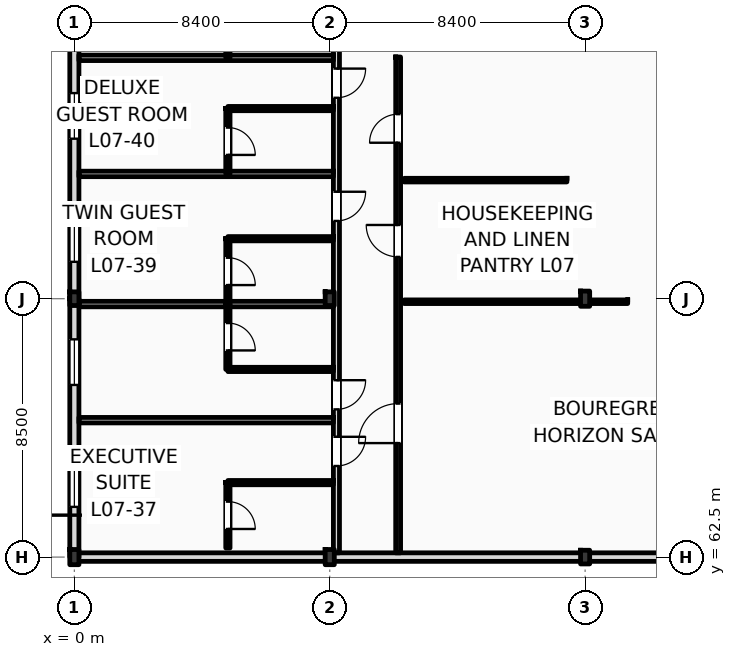
"""IFC4 building model, lengths in metres.
Left out: names, types, materials, properties, quantities, classifications, styles, units other than length and angle.
Written with IfcOpenShell. Run it as: python <this file> out.ifc"""

import sys

from ifc_helpers import new_model, si_unit, direction, frame, frame_2d, origin, origin_2d, place, context, subcontext, project, spatial, rectangle, i_section, extrude, element, fill, save


model = new_model("IFC4")
c1 = context("Model", 3, precision=1e-05, world=origin(), true_north=direction((0.0, 1.0)))
c2 = subcontext(c1, "Body", "Model", "MODEL_VIEW")
j1 = project(units=[si_unit("LENGTHUNIT", "METRE"), si_unit("PLANEANGLEUNIT", "RADIAN")], contexts=[c1])
p1 = place(None, origin())
s1 = spatial("IfcSite", under=j1, at=p1, CompositionType="ELEMENT")
p2 = place(p1, origin())
s2 = spatial("IfcBuilding", under=s1, at=p2, CompositionType="ELEMENT")
p3 = place(p2, frame((0.0, 0.0, 31.8)))
s3 = spatial("IfcBuildingStorey", under=s2, at=p3, CompositionType="ELEMENT", Elevation=31.8)
p4 = place(p3, frame((0.0, 62.5, 0.0), z_axis=(0.0, 0.0, 1.0), x_axis=(1.0, 0.0, 0.0)))
e1 = element("IfcColumn", 1, at=p4, inside=s3, PredefinedType="COLUMN", context=c2, shape_type="SweptSolid", body=[
    extrude(i_section(OverallWidth=0.3, OverallDepth=0.5, WebThickness=0.014, FlangeThickness=0.028, FilletRadius=0.027, at=origin_2d()), origin(), (0.0, 0.0, 1.0), 3.6),
])
p5 = place(p3, frame((0.0, 71.0, 0.0), z_axis=(0.0, 0.0, 1.0), x_axis=(1.0, 0.0, 0.0)))
e2 = element("IfcColumn", 2, at=p5, inside=s3, PredefinedType="COLUMN", context=c2, shape_type="SweptSolid", body=[
    extrude(i_section(OverallWidth=0.3, OverallDepth=0.45, WebThickness=0.014, FlangeThickness=0.026, FilletRadius=0.027, at=origin_2d()), origin(), (0.0, 0.0, 1.0), 3.6),
])
p6 = place(p3, frame((8.4, 62.5, 0.0), z_axis=(0.0, 0.0, 1.0), x_axis=(1.0, 0.0, 0.0)))
e3 = element("IfcColumn", 3, at=p6, inside=s3, PredefinedType="COLUMN", context=c2, shape_type="SweptSolid", body=[
    extrude(i_section(OverallWidth=0.3, OverallDepth=0.5, WebThickness=0.014, FlangeThickness=0.028, FilletRadius=0.027, at=origin_2d()), origin(), (0.0, 0.0, 1.0), 3.6),
])
for number, where, z_axis, x_axis in (
    (4, (8.4, 71.0, 0.0), (0.0, 0.0, 1.0), (1.0, 0.0, 0.0)),
    (5, (16.8, 62.5, 0.0), (0.0, 0.0, 1.0), (1.0, 0.0, 0.0)),
):
    element("IfcColumn", number, at=place(p3, frame(where, z_axis=z_axis, x_axis=x_axis)), inside=s3, PredefinedType="COLUMN", context=c2, shape_type="SweptSolid", body=[
        extrude(i_section(OverallWidth=0.3, OverallDepth=0.45, WebThickness=0.014, FlangeThickness=0.026, FilletRadius=0.027, at=origin_2d()), origin(), (0.0, 0.0, 1.0), 3.6),
    ])
p7 = place(p3, frame((16.8, 71.0, 0.0), z_axis=(0.0, 0.0, 1.0), x_axis=(1.0, 0.0, 0.0)))
e6 = element("IfcColumn", 6, at=p7, inside=s3, PredefinedType="COLUMN", context=c2, shape_type="SweptSolid", body=[
    extrude(i_section(OverallWidth=0.3, OverallDepth=0.5, WebThickness=0.014, FlangeThickness=0.028, FilletRadius=0.027, at=origin_2d()), origin(), (0.0, 0.0, 1.0), 3.6),
])
p8 = place(p3, frame((0.0, 62.5, 0.0), z_axis=(0.0, 0.0, 1.0), x_axis=(0.0, 1.0, 0.0)))
e7 = element("IfcWall", 7, at=p8, inside=s3, PredefinedType="STANDARD", context=c2, shape_type="SweptSolid", body=[
    extrude(rectangle(XDim=8.5, YDim=0.3, at=frame_2d((4.25, 0.0))), origin(), (0.0, 0.0, 1.0), 2.99),
])
p9 = place(p8, frame((1.652, 0.0, 0.9)))
e8 = element("IfcOpeningElement", 8, at=p9, cuts=e7, PredefinedType="OPENING", context=c2, shape_type="SweptSolid", body=[
    extrude(rectangle(XDim=1.5, YDim=1.91, at=frame_2d((0.75, 0.955))), frame((0.0, 0.16, 0.0), z_axis=(0.0, -1.0, 0.0), x_axis=(1.0, 0.0, 0.0)), (0.0, 0.0, 1.0), 0.32),
])
p10 = place(p8, frame((5.663, 0.0, 0.9)))
e9 = element("IfcOpeningElement", 9, at=p10, cuts=e7, PredefinedType="OPENING", context=c2, shape_type="SweptSolid", body=[
    extrude(rectangle(XDim=1.5, YDim=1.91, at=frame_2d((0.75, 0.955))), frame((0.0, 0.16, 0.0), z_axis=(0.0, -1.0, 0.0), x_axis=(1.0, 0.0, 0.0)), (0.0, 0.0, 1.0), 0.32),
])
p11 = place(p3, frame((0.0, 71.0, 0.0), z_axis=(0.0, 0.0, 1.0), x_axis=(0.0, 1.0, 0.0)))
e10 = element("IfcWall", 10, at=p11, inside=s3, PredefinedType="STANDARD", context=c2, shape_type="SweptSolid", body=[
    extrude(rectangle(XDim=8.5, YDim=0.3, at=frame_2d((4.25, 0.0))), origin(), (0.0, 0.0, 1.0), 2.99),
])
p12 = place(p11, frame((1.213, 0.0, 0.9)))
e11 = element("IfcOpeningElement", 11, at=p12, cuts=e10, PredefinedType="OPENING", context=c2, shape_type="SweptSolid", body=[
    extrude(rectangle(XDim=1.5, YDim=1.91, at=frame_2d((0.75, 0.955))), frame((0.0, 0.16, 0.0), z_axis=(0.0, -1.0, 0.0), x_axis=(1.0, 0.0, 0.0)), (0.0, 0.0, 1.0), 0.32),
])
p13 = place(p11, frame((5.263, 0.0, 0.9)))
e12 = element("IfcOpeningElement", 12, at=p13, cuts=e10, PredefinedType="OPENING", context=c2, shape_type="SweptSolid", body=[
    extrude(rectangle(XDim=1.5, YDim=1.91, at=frame_2d((0.75, 0.955))), frame((0.0, 0.16, 0.0), z_axis=(0.0, -1.0, 0.0), x_axis=(1.0, 0.0, 0.0)), (0.0, 0.0, 1.0), 0.32),
])
p14 = place(p3, frame((0.0, 62.5, 0.0), z_axis=(0.0, 0.0, 1.0), x_axis=(1.0, 0.0, 0.0)))
e13 = element("IfcWall", 13, at=p14, inside=s3, PredefinedType="STANDARD", context=c2, shape_type="SweptSolid", body=[
    extrude(rectangle(XDim=25.2, YDim=0.28, at=frame_2d((12.6, 0.0))), origin(), (0.0, 0.0, 1.0), 2.8),
])
p15 = place(p3, frame((8.62, 62.64, 0.0), z_axis=(0.0, 0.0, 1.0), x_axis=(0.0, 1.0, 0.0)))
e14 = element("IfcWall", 14, at=p15, inside=s3, PredefinedType="PARTITIONING", context=c2, shape_type="SweptSolid", body=[
    extrude(rectangle(XDim=32.66, YDim=0.2, at=frame_2d((16.33, 0.0))), origin(), (0.0, 0.0, 1.0), 2.99),
])
p16 = place(p15, frame((2.857, 0.0, 0.0)))
e15 = element("IfcOpeningElement", 15, at=p16, cuts=e14, PredefinedType="OPENING", context=c2, shape_type="SweptSolid", body=[
    extrude(rectangle(XDim=0.96, YDim=2.2, at=frame_2d((0.48, 1.1))), frame((0.0, 0.11, 0.0), z_axis=(0.0, -1.0, 0.0), x_axis=(1.0, 0.0, 0.0)), (0.0, 0.0, 1.0), 0.22),
])
p17 = place(p15, frame((4.719, 0.0, 0.0)))
e16 = element("IfcOpeningElement", 16, at=p17, cuts=e14, PredefinedType="OPENING", context=c2, shape_type="SweptSolid", body=[
    extrude(rectangle(XDim=0.96, YDim=2.2, at=frame_2d((0.48, 1.1))), frame((0.0, 0.11, 0.0), z_axis=(0.0, -1.0, 0.0), x_axis=(1.0, 0.0, 0.0)), (0.0, 0.0, 1.0), 0.22),
])
p18 = place(p15, frame((10.918, 0.0, 0.0)))
e17 = element("IfcOpeningElement", 17, at=p18, cuts=e14, PredefinedType="OPENING", context=c2, shape_type="SweptSolid", body=[
    extrude(rectangle(XDim=0.96, YDim=2.2, at=frame_2d((0.48, 1.1))), frame((0.0, 0.11, 0.0), z_axis=(0.0, -1.0, 0.0), x_axis=(1.0, 0.0, 0.0)), (0.0, 0.0, 1.0), 0.22),
])
p19 = place(p15, frame((14.969, 0.0, 0.0)))
e18 = element("IfcOpeningElement", 18, at=p19, cuts=e14, PredefinedType="OPENING", context=c2, shape_type="SweptSolid", body=[
    extrude(rectangle(XDim=0.96, YDim=2.2, at=frame_2d((0.48, 1.1))), frame((0.0, 0.11, 0.0), z_axis=(0.0, -1.0, 0.0), x_axis=(1.0, 0.0, 0.0)), (0.0, 0.0, 1.0), 0.22),
])
p20 = place(p15, frame((19.018, 0.0, 0.0)))
e19 = element("IfcOpeningElement", 19, at=p20, cuts=e14, PredefinedType="OPENING", context=c2, shape_type="SweptSolid", body=[
    extrude(rectangle(XDim=0.96, YDim=2.2, at=frame_2d((0.48, 1.1))), frame((0.0, 0.11, 0.0), z_axis=(0.0, -1.0, 0.0), x_axis=(1.0, 0.0, 0.0)), (0.0, 0.0, 1.0), 0.22),
])
p21 = place(p15, frame((23.068, 0.0, 0.0)))
e20 = element("IfcOpeningElement", 20, at=p21, cuts=e14, PredefinedType="OPENING", context=c2, shape_type="SweptSolid", body=[
    extrude(rectangle(XDim=0.96, YDim=2.2, at=frame_2d((0.48, 1.1))), frame((0.0, 0.11, 0.0), z_axis=(0.0, -1.0, 0.0), x_axis=(1.0, 0.0, 0.0)), (0.0, 0.0, 1.0), 0.22),
])
p22 = place(p15, frame((27.119, 0.0, 0.0)))
e21 = element("IfcOpeningElement", 21, at=p22, cuts=e14, PredefinedType="OPENING", context=c2, shape_type="SweptSolid", body=[
    extrude(rectangle(XDim=0.96, YDim=2.2, at=frame_2d((0.48, 1.1))), frame((0.0, 0.11, 0.0), z_axis=(0.0, -1.0, 0.0), x_axis=(1.0, 0.0, 0.0)), (0.0, 0.0, 1.0), 0.22),
])
p23 = place(p15, frame((31.207, 0.0, 0.0)))
e22 = element("IfcOpeningElement", 22, at=p23, cuts=e14, PredefinedType="OPENING", context=c2, shape_type="SweptSolid", body=[
    extrude(rectangle(XDim=0.96, YDim=2.2, at=frame_2d((0.48, 1.1))), frame((0.0, 0.11, 0.0), z_axis=(0.0, -1.0, 0.0), x_axis=(1.0, 0.0, 0.0)), (0.0, 0.0, 1.0), 0.22),
])
p24 = place(p3, frame((10.65, 62.64, 0.0), z_axis=(0.0, 0.0, 1.0), x_axis=(0.0, 1.0, 0.0)))
e23 = element("IfcWall", 23, at=p24, inside=s3, PredefinedType="PARTITIONING", context=c2, shape_type="SweptSolid", body=[
    extrude(rectangle(XDim=16.31, YDim=0.16, at=frame_2d((8.155, 0.0))), origin(), (0.0, 0.0, 1.0), 3.36),
])
p25 = place(p24, frame((3.61, 0.0, 0.0)))
e24 = element("IfcOpeningElement", 24, at=p25, cuts=e23, PredefinedType="OPENING", context=c2, shape_type="SweptSolid", body=[
    extrude(rectangle(XDim=1.3, YDim=2.2, at=frame_2d((0.65, 1.1))), frame((0.0, 0.09, 0.0), z_axis=(0.0, -1.0, 0.0), x_axis=(1.0, 0.0, 0.0)), (0.0, 0.0, 1.0), 0.18),
])
p26 = place(p24, frame((9.735, 0.0, 0.0)))
e25 = element("IfcOpeningElement", 25, at=p26, cuts=e23, PredefinedType="OPENING", context=c2, shape_type="SweptSolid", body=[
    extrude(rectangle(XDim=1.05, YDim=2.12, at=frame_2d((0.525, 1.06))), frame((0.0, 0.09, 0.0), z_axis=(0.0, -1.0, 0.0), x_axis=(1.0, 0.0, 0.0)), (0.0, 0.0, 1.0), 0.18),
])
p27 = place(p24, frame((13.49, 0.0, 0.0)))
e26 = element("IfcOpeningElement", 26, at=p27, cuts=e23, PredefinedType="OPENING", context=c2, shape_type="SweptSolid", body=[
    extrude(rectangle(XDim=0.94, YDim=2.15, at=frame_2d((0.47, 1.075))), frame((0.0, 0.09, 0.0), z_axis=(0.0, -1.0, 0.0), x_axis=(1.0, 0.0, 0.0)), (0.0, 0.0, 1.0), 0.18),
])
p28 = place(p3, frame((0.15, 67.004, 0.0), z_axis=(0.0, 0.0, 1.0), x_axis=(1.0, 0.0, 0.0)))
e27 = element("IfcWall", 27, at=p28, inside=s3, PredefinedType="PARTITIONING", context=c2, shape_type="SweptSolid", body=[
    extrude(rectangle(XDim=8.37, YDim=0.18, at=frame_2d((4.185, 0.0))), origin(), (0.0, 0.0, 1.0), 3.36),
])
p29 = place(p3, frame((5.05, 64.95, 0.0), z_axis=(0.0, 0.0, 1.0), x_axis=(1.0, 0.0, 0.0)))
e28 = element("IfcWall", 28, at=p29, inside=s3, PredefinedType="PARTITIONING", context=c2, shape_type="SweptSolid", body=[
    extrude(rectangle(XDim=3.47, YDim=0.14, at=frame_2d((1.735, 0.0))), origin(), (0.0, 0.0, 1.0), 3.36),
])
p30 = place(p3, frame((5.05, 62.8, 0.0), z_axis=(0.0, 0.0, 1.0), x_axis=(0.0, 1.0, 0.0)))
e29 = element("IfcWall", 29, at=p30, inside=s3, PredefinedType="PARTITIONING", context=c2, shape_type="SweptSolid", body=[
    extrude(rectangle(XDim=2.15, YDim=0.14, at=frame_2d((1.075, 0.0))), origin(), (0.0, 0.0, 1.0), 3.36),
])
p31 = place(p30, frame((0.625, 0.0, 0.0)))
e30 = element("IfcOpeningElement", 30, at=p31, cuts=e29, PredefinedType="OPENING", context=c2, shape_type="SweptSolid", body=[
    extrude(rectangle(XDim=0.9, YDim=2.1, at=frame_2d((0.45, 1.05))), frame((0.0, 0.08, 0.0), z_axis=(0.0, -1.0, 0.0), x_axis=(1.0, 0.0, 0.0)), (0.0, 0.0, 1.0), 0.16),
])
p32 = place(p3, frame((0.15, 70.823, 0.0), z_axis=(0.0, 0.0, 1.0), x_axis=(1.0, 0.0, 0.0)))
e31 = element("IfcWall", 31, at=p32, inside=s3, PredefinedType="PARTITIONING", context=c2, shape_type="SweptSolid", body=[
    extrude(rectangle(XDim=8.37, YDim=0.18, at=frame_2d((4.185, 0.0))), origin(), (0.0, 0.0, 1.0), 2.8),
])
p33 = place(p3, frame((5.05, 68.673, 0.0), z_axis=(0.0, 0.0, 1.0), x_axis=(1.0, 0.0, 0.0)))
e32 = element("IfcWall", 32, at=p33, inside=s3, PredefinedType="PARTITIONING", context=c2, shape_type="SweptSolid", body=[
    extrude(rectangle(XDim=3.47, YDim=0.14, at=frame_2d((1.735, 0.0))), origin(), (0.0, 0.0, 1.0), 3.36),
])
p34 = place(p3, frame((5.05, 68.673, 0.0), z_axis=(0.0, 0.0, 1.0), x_axis=(0.0, 1.0, 0.0)))
e33 = element("IfcWall", 33, at=p34, inside=s3, PredefinedType="PARTITIONING", context=c2, shape_type="SweptSolid", body=[
    extrude(rectangle(XDim=2.15, YDim=0.14, at=frame_2d((1.075, 0.0))), origin(), (0.0, 0.0, 1.0), 3.36),
])
p35 = place(p34, frame((0.625, 0.0, 0.0)))
e34 = element("IfcOpeningElement", 34, at=p35, cuts=e33, PredefinedType="OPENING", context=c2, shape_type="SweptSolid", body=[
    extrude(rectangle(XDim=0.9, YDim=2.1, at=frame_2d((0.45, 1.05))), frame((0.0, 0.08, 0.0), z_axis=(0.0, -1.0, 0.0), x_axis=(1.0, 0.0, 0.0)), (0.0, 0.0, 1.0), 0.16),
])
p36 = place(p3, frame((0.15, 75.104, 0.0), z_axis=(0.0, 0.0, 1.0), x_axis=(1.0, 0.0, 0.0)))
e35 = element("IfcWall", 35, at=p36, inside=s3, PredefinedType="PARTITIONING", context=c2, shape_type="SweptSolid", body=[
    extrude(rectangle(XDim=8.37, YDim=0.18, at=frame_2d((4.185, 0.0))), origin(), (0.0, 0.0, 1.0), 3.36),
])
p37 = place(p3, frame((5.05, 72.973, 0.0), z_axis=(0.0, 0.0, 1.0), x_axis=(1.0, 0.0, 0.0)))
e36 = element("IfcWall", 36, at=p37, inside=s3, PredefinedType="PARTITIONING", context=c2, shape_type="SweptSolid", body=[
    extrude(rectangle(XDim=3.47, YDim=0.14, at=frame_2d((1.735, 0.0))), origin(), (0.0, 0.0, 1.0), 3.36),
])
p38 = place(p3, frame((5.05, 70.823, 0.0), z_axis=(0.0, 0.0, 1.0), x_axis=(0.0, 1.0, 0.0)))
e37 = element("IfcWall", 37, at=p38, inside=s3, PredefinedType="PARTITIONING", context=c2, shape_type="SweptSolid", body=[
    extrude(rectangle(XDim=2.15, YDim=0.14, at=frame_2d((1.075, 0.0))), origin(), (0.0, 0.0, 1.0), 3.36),
])
p39 = place(p38, frame((0.625, 0.0, 0.0)))
e38 = element("IfcOpeningElement", 38, at=p39, cuts=e37, PredefinedType="OPENING", context=c2, shape_type="SweptSolid", body=[
    extrude(rectangle(XDim=0.9, YDim=2.1, at=frame_2d((0.45, 1.05))), frame((0.0, 0.08, 0.0), z_axis=(0.0, -1.0, 0.0), x_axis=(1.0, 0.0, 0.0)), (0.0, 0.0, 1.0), 0.16),
])
p40 = place(p3, frame((0.15, 78.923, 0.0), z_axis=(0.0, 0.0, 1.0), x_axis=(1.0, 0.0, 0.0)))
e39 = element("IfcWall", 39, at=p40, inside=s3, PredefinedType="PARTITIONING", context=c2, shape_type="SweptSolid", body=[
    extrude(rectangle(XDim=8.37, YDim=0.18, at=frame_2d((4.185, 0.0))), origin(), (0.0, 0.0, 1.0), 3.36),
])
p41 = place(p3, frame((5.05, 77.254, 0.0), z_axis=(0.0, 0.0, 1.0), x_axis=(1.0, 0.0, 0.0)))
e40 = element("IfcWall", 40, at=p41, inside=s3, PredefinedType="PARTITIONING", context=c2, shape_type="SweptSolid", body=[
    extrude(rectangle(XDim=3.47, YDim=0.14, at=frame_2d((1.735, 0.0))), origin(), (0.0, 0.0, 1.0), 3.36),
])
p42 = place(p3, frame((5.05, 75.104, 0.0), z_axis=(0.0, 0.0, 1.0), x_axis=(0.0, 1.0, 0.0)))
e41 = element("IfcWall", 41, at=p42, inside=s3, PredefinedType="PARTITIONING", context=c2, shape_type="SweptSolid", body=[
    extrude(rectangle(XDim=2.15, YDim=0.14, at=frame_2d((1.075, 0.0))), origin(), (0.0, 0.0, 1.0), 3.36),
])
p43 = place(p42, frame((0.625, 0.0, 0.0)))
e42 = element("IfcOpeningElement", 42, at=p43, cuts=e41, PredefinedType="OPENING", context=c2, shape_type="SweptSolid", body=[
    extrude(rectangle(XDim=0.9, YDim=2.1, at=frame_2d((0.45, 1.05))), frame((0.0, 0.08, 0.0), z_axis=(0.0, -1.0, 0.0), x_axis=(1.0, 0.0, 0.0)), (0.0, 0.0, 1.0), 0.16),
])
p44 = place(p3, frame((5.05, 78.923, 0.0), z_axis=(0.0, 0.0, 1.0), x_axis=(0.0, 1.0, 0.0)))
e43 = element("IfcWall", 43, at=p44, inside=s3, PredefinedType="PARTITIONING", context=c2, shape_type="SweptSolid", body=[
    extrude(rectangle(XDim=2.15, YDim=0.14, at=frame_2d((1.075, 0.0))), origin(), (0.0, 0.0, 1.0), 3.36),
])
p45 = place(p44, frame((0.625, 0.0, 0.0)))
e44 = element("IfcOpeningElement", 44, at=p45, cuts=e43, PredefinedType="OPENING", context=c2, shape_type="SweptSolid", body=[
    extrude(rectangle(XDim=0.9, YDim=2.1, at=frame_2d((0.45, 1.05))), frame((0.0, 0.08, 0.0), z_axis=(0.0, -1.0, 0.0), x_axis=(1.0, 0.0, 0.0)), (0.0, 0.0, 1.0), 0.16),
])
p46 = place(p3, frame((10.85, 70.9, 0.0), z_axis=(0.0, 0.0, 1.0), x_axis=(1.0, 0.0, 0.0)))
e45 = element("IfcWall", 45, at=p46, inside=s3, PredefinedType="PARTITIONING", context=c2, shape_type="SweptSolid", body=[
    extrude(rectangle(XDim=7.35, YDim=0.12, at=frame_2d((3.675, 0.0))), origin(), (0.0, 0.0, 1.0), 2.8),
])
p47 = place(p3, frame((10.85, 74.9, 0.0), z_axis=(0.0, 0.0, 1.0), x_axis=(1.0, 0.0, 0.0)))
e46 = element("IfcWall", 46, at=p47, inside=s3, PredefinedType="PARTITIONING", context=c2, shape_type="SweptSolid", body=[
    extrude(rectangle(XDim=5.35, YDim=0.12, at=frame_2d((2.675, 0.0))), origin(), (0.0, 0.0, 1.0), 3.36),
])
p48 = place(p9, origin())
e47 = element("IfcWindow", 47, at=p48, inside=s3, PartitioningType="DOUBLE_PANEL_VERTICAL", PredefinedType="WINDOW", context=c2, shape_type="SweptSolid", body=[
    extrude(rectangle(XDim=1.5, YDim=1.91, at=frame_2d((0.75, 0.955))), frame((0.0, 0.03, 0.0), z_axis=(0.0, -1.0, 0.0), x_axis=(1.0, 0.0, 0.0)), (0.0, 0.0, 1.0), 0.06),
])
fill(e8, e47)
p49 = place(p10, origin())
e48 = element("IfcWindow", 48, at=p49, inside=s3, PartitioningType="DOUBLE_PANEL_VERTICAL", PredefinedType="WINDOW", context=c2, shape_type="SweptSolid", body=[
    extrude(rectangle(XDim=1.5, YDim=1.91, at=frame_2d((0.75, 0.955))), frame((0.0, 0.03, 0.0), z_axis=(0.0, -1.0, 0.0), x_axis=(1.0, 0.0, 0.0)), (0.0, 0.0, 1.0), 0.06),
])
fill(e9, e48)
p50 = place(p12, origin())
e49 = element("IfcWindow", 49, at=p50, inside=s3, PartitioningType="DOUBLE_PANEL_VERTICAL", PredefinedType="WINDOW", context=c2, shape_type="SweptSolid", body=[
    extrude(rectangle(XDim=1.5, YDim=1.91, at=frame_2d((0.75, 0.955))), frame((0.0, 0.03, 0.0), z_axis=(0.0, -1.0, 0.0), x_axis=(1.0, 0.0, 0.0)), (0.0, 0.0, 1.0), 0.06),
])
fill(e11, e49)
p51 = place(p13, origin())
e50 = element("IfcWindow", 50, at=p51, inside=s3, PartitioningType="DOUBLE_PANEL_VERTICAL", PredefinedType="WINDOW", context=c2, shape_type="SweptSolid", body=[
    extrude(rectangle(XDim=1.5, YDim=1.91, at=frame_2d((0.75, 0.955))), frame((0.0, 0.03, 0.0), z_axis=(0.0, -1.0, 0.0), x_axis=(1.0, 0.0, 0.0)), (0.0, 0.0, 1.0), 0.06),
])
fill(e12, e50)
p52 = place(p16, frame((0.96, 0.0, 0.0), z_axis=(0.0, 0.0, 1.0), x_axis=(-1.0, 0.0, 0.0)))
e51 = element("IfcDoor", 51, at=p52, inside=s3, OperationType="SINGLE_SWING_RIGHT", PredefinedType="DOOR", context=c2, shape_type="SweptSolid", body=[
    extrude(rectangle(XDim=0.96, YDim=2.2, at=frame_2d((0.48, 1.1))), frame((0.0, 0.025, 0.0), z_axis=(0.0, -1.0, 0.0), x_axis=(1.0, 0.0, 0.0)), (0.0, 0.0, 1.0), 0.05),
])
fill(e15, e51)
p53 = place(p31, frame((0.9, 0.0, 0.0), z_axis=(0.0, 0.0, 1.0), x_axis=(-1.0, 0.0, 0.0)))
e52 = element("IfcDoor", 52, at=p53, inside=s3, OperationType="SINGLE_SWING_LEFT", PredefinedType="DOOR", context=c2, shape_type="SweptSolid", body=[
    extrude(rectangle(XDim=0.9, YDim=2.1, at=frame_2d((0.45, 1.05))), frame((0.0, 0.025, 0.0), z_axis=(0.0, -1.0, 0.0), x_axis=(1.0, 0.0, 0.0)), (0.0, 0.0, 1.0), 0.05),
])
fill(e30, e52)
p54 = place(p17, frame((0.96, 0.0, 0.0), z_axis=(0.0, 0.0, 1.0), x_axis=(-1.0, 0.0, 0.0)))
e53 = element("IfcDoor", 53, at=p54, inside=s3, OperationType="SINGLE_SWING_RIGHT", PredefinedType="DOOR", context=c2, shape_type="SweptSolid", body=[
    extrude(rectangle(XDim=0.96, YDim=2.2, at=frame_2d((0.48, 1.1))), frame((0.0, 0.025, 0.0), z_axis=(0.0, -1.0, 0.0), x_axis=(1.0, 0.0, 0.0)), (0.0, 0.0, 1.0), 0.05),
])
fill(e16, e53)
p55 = place(p35, frame((0.9, 0.0, 0.0), z_axis=(0.0, 0.0, 1.0), x_axis=(-1.0, 0.0, 0.0)))
e54 = element("IfcDoor", 54, at=p55, inside=s3, OperationType="SINGLE_SWING_LEFT", PredefinedType="DOOR", context=c2, shape_type="SweptSolid", body=[
    extrude(rectangle(XDim=0.9, YDim=2.1, at=frame_2d((0.45, 1.05))), frame((0.0, 0.025, 0.0), z_axis=(0.0, -1.0, 0.0), x_axis=(1.0, 0.0, 0.0)), (0.0, 0.0, 1.0), 0.05),
])
fill(e34, e54)
p56 = place(p18, frame((0.96, 0.0, 0.0), z_axis=(0.0, 0.0, 1.0), x_axis=(-1.0, 0.0, 0.0)))
e55 = element("IfcDoor", 55, at=p56, inside=s3, OperationType="SINGLE_SWING_RIGHT", PredefinedType="DOOR", context=c2, shape_type="SweptSolid", body=[
    extrude(rectangle(XDim=0.96, YDim=2.2, at=frame_2d((0.48, 1.1))), frame((0.0, 0.025, 0.0), z_axis=(0.0, -1.0, 0.0), x_axis=(1.0, 0.0, 0.0)), (0.0, 0.0, 1.0), 0.05),
])
fill(e17, e55)
p57 = place(p39, frame((0.9, 0.0, 0.0), z_axis=(0.0, 0.0, 1.0), x_axis=(-1.0, 0.0, 0.0)))
e56 = element("IfcDoor", 56, at=p57, inside=s3, OperationType="SINGLE_SWING_LEFT", PredefinedType="DOOR", context=c2, shape_type="SweptSolid", body=[
    extrude(rectangle(XDim=0.9, YDim=2.1, at=frame_2d((0.45, 1.05))), frame((0.0, 0.025, 0.0), z_axis=(0.0, -1.0, 0.0), x_axis=(1.0, 0.0, 0.0)), (0.0, 0.0, 1.0), 0.05),
])
fill(e38, e56)
p58 = place(p19, frame((0.96, 0.0, 0.0), z_axis=(0.0, 0.0, 1.0), x_axis=(-1.0, 0.0, 0.0)))
e57 = element("IfcDoor", 57, at=p58, inside=s3, OperationType="SINGLE_SWING_RIGHT", PredefinedType="DOOR", context=c2, shape_type="SweptSolid", body=[
    extrude(rectangle(XDim=0.96, YDim=2.2, at=frame_2d((0.48, 1.1))), frame((0.0, 0.025, 0.0), z_axis=(0.0, -1.0, 0.0), x_axis=(1.0, 0.0, 0.0)), (0.0, 0.0, 1.0), 0.05),
])
fill(e18, e57)
p59 = place(p43, frame((0.9, 0.0, 0.0), z_axis=(0.0, 0.0, 1.0), x_axis=(-1.0, 0.0, 0.0)))
e58 = element("IfcDoor", 58, at=p59, inside=s3, OperationType="SINGLE_SWING_LEFT", PredefinedType="DOOR", context=c2, shape_type="SweptSolid", body=[
    extrude(rectangle(XDim=0.9, YDim=2.1, at=frame_2d((0.45, 1.05))), frame((0.0, 0.025, 0.0), z_axis=(0.0, -1.0, 0.0), x_axis=(1.0, 0.0, 0.0)), (0.0, 0.0, 1.0), 0.05),
])
fill(e42, e58)
p60 = place(p25, origin())
e59 = element("IfcDoor", 59, at=p60, inside=s3, OperationType="SINGLE_SWING_LEFT", PredefinedType="DOOR", context=c2, shape_type="SweptSolid", body=[
    extrude(rectangle(XDim=1.3, YDim=2.2, at=frame_2d((0.65, 1.1))), frame((0.0, 0.025, 0.0), z_axis=(0.0, -1.0, 0.0), x_axis=(1.0, 0.0, 0.0)), (0.0, 0.0, 1.0), 0.05),
])
fill(e24, e59)
p61 = place(p26, origin())
e60 = element("IfcDoor", 60, at=p61, inside=s3, OperationType="SINGLE_SWING_RIGHT", PredefinedType="DOOR", context=c2, shape_type="SweptSolid", body=[
    extrude(rectangle(XDim=1.05, YDim=2.12, at=frame_2d((0.525, 1.06))), frame((0.0, 0.025, 0.0), z_axis=(0.0, -1.0, 0.0), x_axis=(1.0, 0.0, 0.0)), (0.0, 0.0, 1.0), 0.05),
])
fill(e25, e60)
p62 = place(p27, origin())
e61 = element("IfcDoor", 61, at=p62, inside=s3, OperationType="SINGLE_SWING_LEFT", PredefinedType="DOOR", context=c2, shape_type="SweptSolid", body=[
    extrude(rectangle(XDim=0.94, YDim=2.15, at=frame_2d((0.47, 1.075))), frame((0.0, 0.025, 0.0), z_axis=(0.0, -1.0, 0.0), x_axis=(1.0, 0.0, 0.0)), (0.0, 0.0, 1.0), 0.05),
])
fill(e26, e61)
save(model, sys.argv[1])
